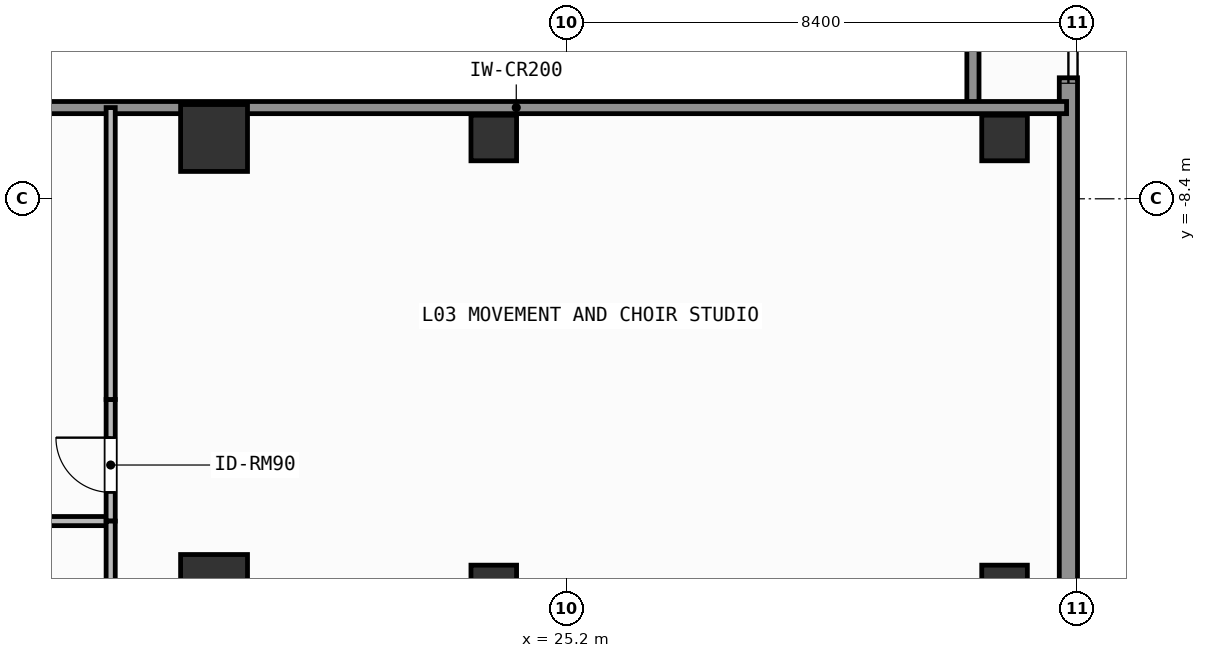
"""IFC4 building model, lengths in metres.
Left out: names, types, materials, properties, quantities, classifications, styles, units other than length and angle.
Written with IfcOpenShell. Run it as: python <this file> out.ifc"""

import sys

from ifc_helpers import new_model, si_unit, direction, frame, frame_2d, origin, origin_2d, place, context, subcontext, project, spatial, rectangle, extrude, element, fill, save


model = new_model("IFC4")
c1 = context("Model", 3, precision=1e-05, world=origin(), true_north=direction((0.0, 1.0)))
c2 = subcontext(c1, "Body", "Model", "MODEL_VIEW")
j1 = project(units=[si_unit("LENGTHUNIT", "METRE"), si_unit("PLANEANGLEUNIT", "RADIAN")], contexts=[c1])
p1 = place(None, origin())
s1 = spatial("IfcSite", under=j1, at=p1, CompositionType="ELEMENT")
p2 = place(p1, origin())
s2 = spatial("IfcBuilding", under=s1, at=p2, CompositionType="ELEMENT")
p3 = place(p2, frame((0.0, 0.0, 9.0)))
s3 = spatial("IfcBuildingStorey", under=s2, at=p3, CompositionType="ELEMENT", Elevation=9.0)
for number, where, z_axis, x_axis in (
    (1, (19.4, -14.8, 0.0), (0.0, 0.0, 1.0), (1.0, 0.0, 0.0)),
    (2, (19.4, -7.4, 0.0), (0.0, 0.0, 1.0), (1.0, 0.0, 0.0)),
):
    element("IfcColumn", number, at=place(p3, frame(where, z_axis=z_axis, x_axis=x_axis)), inside=s3, PredefinedType="COLUMN", context=c2, shape_type="SweptSolid", body=[
        extrude(rectangle(XDim=1.1, YDim=1.1, at=origin_2d()), origin(), (0.0, 0.0, 1.0), 4.2),
    ])
for number, where, z_axis, x_axis in (
    (3, (24.0, -14.8, 0.0), (0.0, 0.0, 1.0), (1.0, 0.0, 0.0)),
    (4, (24.0, -7.4, 0.0), (0.0, 0.0, 1.0), (1.0, 0.0, 0.0)),
    (5, (32.4, -14.8, 0.0), (0.0, 0.0, 1.0), (1.0, 0.0, 0.0)),
    (6, (32.4, -7.4, 0.0), (0.0, 0.0, 1.0), (1.0, 0.0, 0.0)),
):
    element("IfcColumn", number, at=place(p3, frame(where, z_axis=z_axis, x_axis=x_axis)), inside=s3, PredefinedType="COLUMN", context=c2, shape_type="SweptSolid", body=[
        extrude(rectangle(XDim=0.75, YDim=0.75, at=origin_2d()), origin(), (0.0, 0.0, 1.0), 4.2),
    ])
p4 = place(p3, frame((33.45, -20.5, 0.0), z_axis=(0.0, 0.0, 1.0), x_axis=(0.0, 1.0, 0.0)))
e7 = element("IfcWall", 7, at=p4, inside=s3, PredefinedType="SOLIDWALL", context=c2, shape_type="SweptSolid", body=[
    extrude(rectangle(XDim=14.09, YDim=0.3, at=frame_2d((7.045, 0.0))), origin(), (0.0, 0.0, 1.0), 3.96),
])
p5 = place(p3, frame((11.6, -13.7, 0.0), z_axis=(0.0, 0.0, 1.0), x_axis=(1.0, 0.0, 0.0)))
e8 = element("IfcWall", 8, at=p5, inside=s3, PredefinedType="PARTITIONING", context=c2, shape_type="SweptSolid", body=[
    extrude(rectangle(XDim=6.05, YDim=0.15, at=frame_2d((3.025, 0.0))), origin(), (0.0, 0.0, 1.0), 3.96),
])
p6 = place(p5, frame((1.412, 0.0, 0.0)))
e9 = element("IfcOpeningElement", 9, at=p6, cuts=e8, PredefinedType="OPENING", context=c2, shape_type="SweptSolid", body=[
    extrude(rectangle(XDim=0.9, YDim=2.1, at=frame_2d((0.45, 1.05))), frame((0.0, 0.085, 0.0), z_axis=(0.0, -1.0, 0.0), x_axis=(1.0, 0.0, 0.0)), (0.0, 0.0, 1.0), 0.17),
])
p7 = place(p3, frame((17.7, -13.7, 0.0), z_axis=(0.0, 0.0, 1.0), x_axis=(0.0, 1.0, 0.0)))
e10 = element("IfcWall", 10, at=p7, inside=s3, PredefinedType="PARTITIONING", context=c2, shape_type="SweptSolid", body=[
    extrude(rectangle(XDim=2.0, YDim=0.15, at=frame_2d((1.0, 0.0))), origin(), (0.0, 0.0, 1.0), 3.96),
])
p8 = place(p7, frame((0.472, 0.0, 0.0)))
e11 = element("IfcOpeningElement", 11, at=p8, cuts=e10, PredefinedType="OPENING", context=c2, shape_type="SweptSolid", body=[
    extrude(rectangle(XDim=0.9, YDim=2.1, at=frame_2d((0.45, 1.05))), frame((0.0, 0.085, 0.0), z_axis=(0.0, -1.0, 0.0), x_axis=(1.0, 0.0, 0.0)), (0.0, 0.0, 1.0), 0.17),
])
p9 = place(p3, frame((31.88, -6.9, 0.0), z_axis=(0.0, 0.0, 1.0), x_axis=(0.0, 1.0, 0.0)))
e12 = element("IfcWall", 12, at=p9, inside=s3, PredefinedType="SOLIDWALL", context=c2, shape_type="SweptSolid", body=[
    extrude(rectangle(XDim=13.8, YDim=0.2, at=frame_2d((6.9, 0.0))), origin(), (0.0, 0.0, 1.0), 3.96),
])
p10 = place(p3, frame((15.32, -6.9, 0.0), z_axis=(0.0, 0.0, 1.0), x_axis=(1.0, 0.0, 0.0)))
e13 = element("IfcWall", 13, at=p10, inside=s3, PredefinedType="SOLIDWALL", context=c2, shape_type="SweptSolid", body=[
    extrude(rectangle(XDim=18.1, YDim=0.2, at=frame_2d((9.05, 0.0))), origin(), (0.0, 0.0, 1.0), 3.96),
])
p11 = place(p3, frame((17.7, -13.7, 0.0), z_axis=(0.0, 0.0, 1.0), x_axis=(0.0, -1.0, 0.0)))
e14 = element("IfcWall", 14, at=p11, inside=s3, PredefinedType="PARTITIONING", context=c2, shape_type="SweptSolid", body=[
    extrude(rectangle(XDim=11.22, YDim=0.15, at=frame_2d((5.61, 0.0))), origin(), (0.0, 0.0, 1.0), 3.96),
])
p12 = place(p3, frame((17.7, -11.7, 0.0), z_axis=(0.0, 0.0, 1.0), x_axis=(0.0, 1.0, 0.0)))
e15 = element("IfcWall", 15, at=p12, inside=s3, PredefinedType="PARTITIONING", context=c2, shape_type="SweptSolid", body=[
    extrude(rectangle(XDim=4.8, YDim=0.15, at=frame_2d((2.4, 0.0))), origin(), (0.0, 0.0, 1.0), 3.96),
])
p13 = place(p8, origin())
e16 = element("IfcDoor", 16, at=p13, inside=s3, OperationType="SINGLE_SWING_RIGHT", PredefinedType="DOOR", context=c2, shape_type="SweptSolid", body=[
    extrude(rectangle(XDim=0.9, YDim=2.1, at=frame_2d((0.45, 1.05))), frame((0.0, 0.025, 0.0), z_axis=(0.0, -1.0, 0.0), x_axis=(1.0, 0.0, 0.0)), (0.0, 0.0, 1.0), 0.05),
])
fill(e11, e16)
save(model, sys.argv[1])
